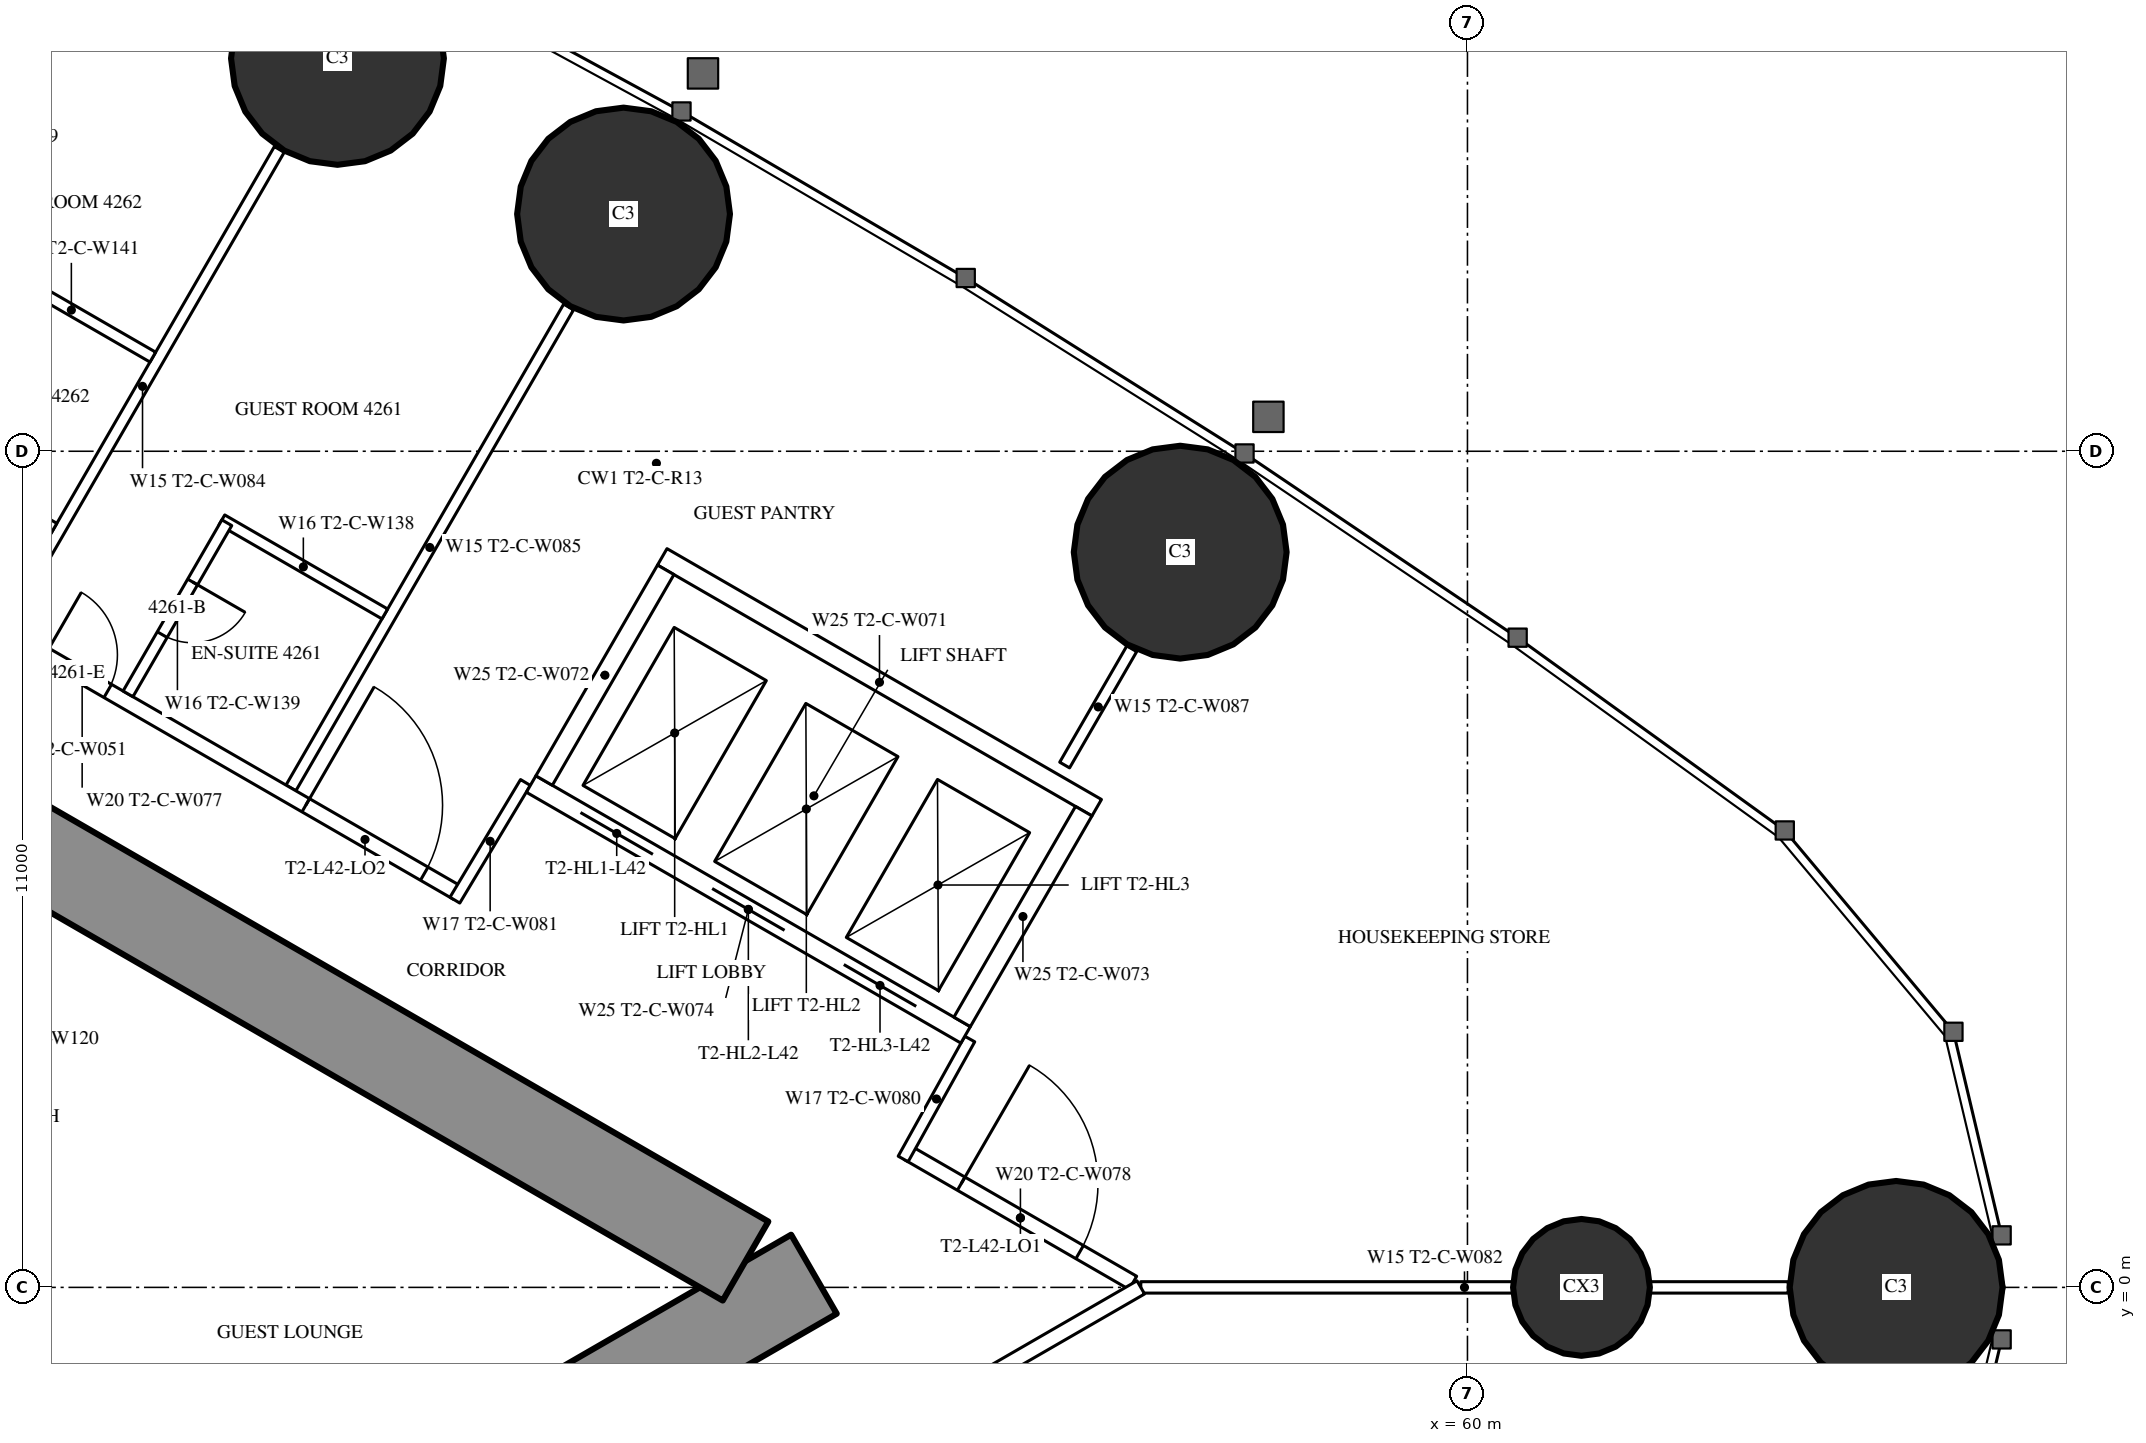
"""IFC4 building model, lengths in metres.
Left out: names, types, materials, properties, quantities, classifications, styles, units other than length and angle.
Written with IfcOpenShell. Run it as: python <this file> out.ifc"""

import sys

from ifc_helpers import new_model, si_unit, direction, frame, frame_2d, origin, origin_2d, place, context, subcontext, project, spatial, rectangle, circle, extrude, element, fill, save


model = new_model("IFC4")
c1 = context("Model", 3, precision=1e-05, world=origin(), true_north=direction((0.0, 1.0)))
c2 = subcontext(c1, "Body", "Model", "MODEL_VIEW")
j1 = project(units=[si_unit("LENGTHUNIT", "METRE"), si_unit("PLANEANGLEUNIT", "RADIAN")], contexts=[c1])
p1 = place(None, origin())
s1 = spatial("IfcSite", under=j1, at=p1, CompositionType="ELEMENT")
p2 = place(p1, origin())
s2 = spatial("IfcBuilding", under=s1, at=p2, CompositionType="ELEMENT")
p3 = place(p2, frame((0.0, 0.0, 159.8)))
s3 = spatial("IfcBuildingStorey", under=s2, at=p3, CompositionType="ELEMENT", Elevation=159.8)
for number, where, z_axis, x_axis in (
    (1, (65.64, 0.0, 0.0), (0.0, 0.0, 1.0), (1.0, 0.0, 0.0)),
    (2, (56.221, 9.672, 0.0), (0.0, 0.0, 1.0), (1.0, 0.0, 0.0)),
    (3, (48.897, 14.121, 0.0), (0.0, 0.0, 1.0), (1.0, 0.0, 0.0)),
    (4, (45.134, 16.168, 0.0), (0.0, 0.0, 1.0), (1.0, 0.0, 0.0)),
):
    element("IfcColumn", number, at=place(p3, frame(where, z_axis=z_axis, x_axis=x_axis)), inside=s3, PredefinedType="COLUMN", context=c2, shape_type="SweptSolid", body=[
        extrude(circle(Radius=1.4, at=origin_2d()), origin(), (0.0, 0.0, 1.0), 3.5),
    ])
p4 = place(p3, frame((61.5, 0.0, 0.0), z_axis=(0.0, 0.0, 1.0), x_axis=(1.0, 0.0, 0.0)))
e5 = element("IfcColumn", 5, at=p4, inside=s3, PredefinedType="COLUMN", context=c2, shape_type="SweptSolid", body=[
    extrude(circle(Radius=0.9, at=origin_2d()), origin(), (0.0, 0.0, 1.0), 3.5),
])
p5 = place(p3, frame((27.2, -13.8, 0.0), z_axis=(0.0, 0.0, 1.0), x_axis=(0.866027159892, 0.499996958321, 0.0)))
e6 = element("IfcWall", 6, at=p5, inside=s3, PredefinedType="SHEAR", context=c2, shape_type="SweptSolid", body=[
    extrude(rectangle(XDim=27.947, YDim=1.2, at=frame_2d((13.973, 0.0))), origin(), (0.0, 0.0, 1.0), 3.5),
])
p6 = place(p5, frame((4.6, 0.0, 0.0)))
e7 = element("IfcOpeningElement", 7, at=p6, cuts=e6, PredefinedType="OPENING", context=c2, shape_type="SweptSolid", body=[
    extrude(rectangle(XDim=1.0, YDim=2.2, at=frame_2d((0.5, 1.1))), frame((0.0, 0.61, 0.0), z_axis=(0.0, -1.0, 0.0), x_axis=(1.0, 0.0, 0.0)), (0.0, 0.0, 1.0), 1.22),
])
p7 = place(p5, frame((13.395, 0.0, 0.0)))
e8 = element("IfcOpeningElement", 8, at=p7, cuts=e6, PredefinedType="OPENING", context=c2, shape_type="SweptSolid", body=[
    extrude(rectangle(XDim=1.8, YDim=2.2, at=frame_2d((0.9, 1.1))), frame((0.0, 0.61, 0.0), z_axis=(0.0, -1.0, 0.0), x_axis=(1.0, 0.0, 0.0)), (0.0, 0.0, 1.0), 1.22),
])
p8 = place(p3, frame((27.2, 13.8, 0.0), z_axis=(0.0, 0.0, 1.0), x_axis=(0.866024515034, -0.500001539357, 0.0)))
e9 = element("IfcWall", 9, at=p8, inside=s3, PredefinedType="SHEAR", context=c2, shape_type="SweptSolid", body=[
    extrude(rectangle(XDim=26.907, YDim=1.2, at=frame_2d((13.454, 0.0))), origin(), (0.0, 0.0, 1.0), 3.5),
])
p9 = place(p8, frame((4.6, 0.0, 0.0)))
e10 = element("IfcOpeningElement", 10, at=p9, cuts=e9, PredefinedType="OPENING", context=c2, shape_type="SweptSolid", body=[
    extrude(rectangle(XDim=1.0, YDim=2.2, at=frame_2d((0.5, 1.1))), frame((0.0, 0.61, 0.0), z_axis=(0.0, -1.0, 0.0), x_axis=(1.0, 0.0, 0.0)), (0.0, 0.0, 1.0), 1.22),
])
p10 = place(p8, frame((13.395, 0.0, 0.0)))
e11 = element("IfcOpeningElement", 11, at=p10, cuts=e9, PredefinedType="OPENING", context=c2, shape_type="SweptSolid", body=[
    extrude(rectangle(XDim=1.8, YDim=2.2, at=frame_2d((0.9, 1.1))), frame((0.0, 0.61, 0.0), z_axis=(0.0, -1.0, 0.0), x_axis=(1.0, 0.0, 0.0)), (0.0, 0.0, 1.0), 1.22),
])
p11 = place(p3, frame((37.022, 10.9, 0.0), z_axis=(0.0, 0.0, 1.0), x_axis=(0.499998620953, 0.866026199976, 0.0)))
e12 = element("IfcWall", 12, at=p11, inside=s3, PredefinedType="PARTITIONING", context=c2, shape_type="SweptSolid", body=[
    extrude(rectangle(XDim=9.77, YDim=0.15, at=frame_2d((4.885, 0.0))), origin(), (0.0, 0.0, 1.0), 3.25),
])
p12 = place(p3, frame((40.769, 8.737, 0.0), z_axis=(0.0, 0.0, 1.0), x_axis=(0.500013115284, 0.866017831539, 0.0)))
e13 = element("IfcWall", 13, at=p12, inside=s3, PredefinedType="PARTITIONING", context=c2, shape_type="SweptSolid", body=[
    extrude(rectangle(XDim=7.198, YDim=0.15, at=frame_2d((3.599, 0.0))), origin(), (0.0, 0.0, 1.0), 2.3),
])
p13 = place(p3, frame((44.521, 6.571, 0.0), z_axis=(0.0, 0.0, 1.0), x_axis=(0.500020376429, 0.866013639128, 0.0)))
e14 = element("IfcWall", 14, at=p13, inside=s3, PredefinedType="PARTITIONING", context=c2, shape_type="SweptSolid", body=[
    extrude(rectangle(XDim=7.306, YDim=0.15, at=frame_2d((3.653, 0.0))), origin(), (0.0, 0.0, 1.0), 2.3),
])
p14 = place(p3, frame((55.702, 0.0, 0.0), z_axis=(0.0, 0.0, 1.0), x_axis=(1.0, 0.0, 0.0)))
e15 = element("IfcWall", 15, at=p14, inside=s3, PredefinedType="PARTITIONING", context=c2, shape_type="SweptSolid", body=[
    extrude(rectangle(XDim=8.518, YDim=0.15, at=frame_2d((4.259, 0.0))), origin(), (0.0, 0.0, 1.0), 2.3),
])
p15 = place(p3, frame((54.7, 6.872, 0.0), z_axis=(0.0, 0.0, 1.0), x_axis=(0.499989690894, 0.866031355668, 0.0)))
e16 = element("IfcWall", 16, at=p15, inside=s3, PredefinedType="PARTITIONING", context=c2, shape_type="SweptSolid", body=[
    extrude(rectangle(XDim=1.766, YDim=0.15, at=frame_2d((0.883, 0.0))), origin(), (0.0, 0.0, 1.0), 3.25),
])
p16 = place(p3, frame((36.834, 10.894, 0.0), z_axis=(0.0, 0.0, 1.0), x_axis=(0.866031655879, -0.499989170898, 0.0)))
e17 = element("IfcWall", 17, at=p16, inside=s3, PredefinedType="PARTITIONING", context=c2, shape_type="SweptSolid", body=[
    extrude(rectangle(XDim=11.41, YDim=0.2, at=frame_2d((5.705, 0.0))), origin(), (0.0, 0.0, 1.0), 3.25),
])
p17 = place(p16, frame((5.144, 0.0, 0.0)))
e18 = element("IfcOpeningElement", 18, at=p17, cuts=e17, PredefinedType="OPENING", context=c2, shape_type="SweptSolid", body=[
    extrude(rectangle(XDim=0.95, YDim=2.2, at=frame_2d((0.475, 1.1))), frame((0.0, 0.11, 0.0), z_axis=(0.0, -1.0, 0.0), x_axis=(1.0, 0.0, 0.0)), (0.0, 0.0, 1.0), 0.22),
])
p18 = place(p16, frame((3.161, 0.0, 0.0)))
e19 = element("IfcOpeningElement", 19, at=p18, cuts=e17, PredefinedType="OPENING", context=c2, shape_type="SweptSolid", body=[
    extrude(rectangle(XDim=0.95, YDim=2.2, at=frame_2d((0.475, 1.1))), frame((0.0, 0.11, 0.0), z_axis=(0.0, -1.0, 0.0), x_axis=(1.0, 0.0, 0.0)), (0.0, 0.0, 1.0), 0.22),
])
p19 = place(p16, frame((9.102, 0.0, 0.0)))
e20 = element("IfcOpeningElement", 20, at=p19, cuts=e17, PredefinedType="OPENING", context=c2, shape_type="SweptSolid", body=[
    extrude(rectangle(XDim=1.8, YDim=2.2, at=frame_2d((0.9, 1.1))), frame((0.0, 0.11, 0.0), z_axis=(0.0, -1.0, 0.0), x_axis=(1.0, 0.0, 0.0)), (0.0, 0.0, 1.0), 0.22),
])
p20 = place(p3, frame((52.639, 1.769, 0.0), z_axis=(0.0, 0.0, 1.0), x_axis=(0.866027340901, -0.4999966448, 0.0)))
e21 = element("IfcWall", 21, at=p20, inside=s3, PredefinedType="PARTITIONING", context=c2, shape_type="SweptSolid", body=[
    extrude(rectangle(XDim=3.417, YDim=0.2, at=frame_2d((1.708, 0.0))), origin(), (0.0, 0.0, 1.0), 3.25),
])
p21 = place(p20, frame((0.809, 0.0, 0.0)))
e22 = element("IfcOpeningElement", 22, at=p21, cuts=e21, PredefinedType="OPENING", context=c2, shape_type="SweptSolid", body=[
    extrude(rectangle(XDim=1.8, YDim=2.2, at=frame_2d((0.9, 1.1))), frame((0.0, 0.11, 0.0), z_axis=(0.0, -1.0, 0.0), x_axis=(1.0, 0.0, 0.0)), (0.0, 0.0, 1.0), 0.22),
])
p22 = place(p3, frame((52.576, 1.689, 0.0), z_axis=(0.0, 0.0, 1.0), x_axis=(0.485424724123, 0.874278466629, 0.0)))
e23 = element("IfcWall", 23, at=p22, inside=s3, PredefinedType="PARTITIONING", context=c2, shape_type="SweptSolid", body=[
    extrude(rectangle(XDim=1.805, YDim=0.15, at=frame_2d((0.903, 0.0))), origin(), (0.0, 0.0, 1.0), 3.25),
])
p23 = place(p3, frame((47.606, 6.643, 0.0), z_axis=(0.0, 0.0, 1.0), x_axis=(-0.514237157483, -0.857648031458, 0.0)))
e24 = element("IfcWall", 24, at=p23, inside=s3, PredefinedType="PARTITIONING", context=c2, shape_type="SweptSolid", body=[
    extrude(rectangle(XDim=1.805, YDim=0.15, at=frame_2d((0.902, 0.0))), origin(), (0.0, 0.0, 1.0), 3.25),
])
p24 = place(p3, frame((40.741, -8.638, 0.0), z_axis=(0.0, 0.0, 1.0), x_axis=(0.866022967338, 0.500004220025, 0.0)))
e25 = element("IfcWall", 25, at=p24, inside=s3, PredefinedType="PARTITIONING", context=c2, shape_type="SweptSolid", body=[
    extrude(rectangle(XDim=17.276, YDim=0.2, at=frame_2d((8.638, 0.0))), origin(), (0.0, 0.0, 1.0), 3.25),
])
p25 = place(p24, frame((7.316, 0.0, 0.0)))
e26 = element("IfcOpeningElement", 26, at=p25, cuts=e25, PredefinedType="OPENING", context=c2, shape_type="SweptSolid", body=[
    extrude(rectangle(XDim=0.95, YDim=2.2, at=frame_2d((0.475, 1.1))), frame((0.0, 0.11, 0.0), z_axis=(0.0, -1.0, 0.0), x_axis=(1.0, 0.0, 0.0)), (0.0, 0.0, 1.0), 0.22),
])
p26 = place(p24, frame((11.366, 0.0, 0.0)))
e27 = element("IfcOpeningElement", 27, at=p26, cuts=e25, PredefinedType="OPENING", context=c2, shape_type="SweptSolid", body=[
    extrude(rectangle(XDim=0.95, YDim=2.2, at=frame_2d((0.475, 1.1))), frame((0.0, 0.11, 0.0), z_axis=(0.0, -1.0, 0.0), x_axis=(1.0, 0.0, 0.0)), (0.0, 0.0, 1.0), 0.22),
])
p27 = place(p24, frame((13.347, 0.0, 0.0)))
e28 = element("IfcOpeningElement", 28, at=p27, cuts=e25, PredefinedType="OPENING", context=c2, shape_type="SweptSolid", body=[
    extrude(rectangle(XDim=0.95, YDim=2.2, at=frame_2d((0.475, 1.1))), frame((0.0, 0.11, 0.0), z_axis=(0.0, -1.0, 0.0), x_axis=(1.0, 0.0, 0.0)), (0.0, 0.0, 1.0), 0.22),
])
p28 = place(p3, frame((43.613, 10.097, 0.0), z_axis=(0.0, 0.0, 1.0), x_axis=(0.866031185235, -0.4999899861, 0.0)))
e29 = element("IfcWall", 29, at=p28, inside=s3, PredefinedType="PARTITIONING", context=c2, shape_type="SweptSolid", body=[
    extrude(rectangle(XDim=2.475, YDim=0.15, at=frame_2d((1.238, 0.0))), origin(), (0.0, 0.0, 1.0), 3.25),
])
p29 = place(p3, frame((42.378, 7.808, 0.0), z_axis=(0.0, 0.0, 1.0), x_axis=(0.500006934395, 0.866021400173, 0.0)))
e30 = element("IfcWall", 30, at=p29, inside=s3, PredefinedType="PARTITIONING", context=c2, shape_type="SweptSolid", body=[
    extrude(rectangle(XDim=2.6, YDim=0.15, at=frame_2d((1.3, 0.0))), origin(), (0.0, 0.0, 1.0), 3.25),
])
p30 = place(p29, frame((0.9, 0.0, 0.0)))
e31 = element("IfcOpeningElement", 31, at=p30, cuts=e30, PredefinedType="OPENING", context=c2, shape_type="SweptSolid", body=[
    extrude(rectangle(XDim=0.8, YDim=2.2, at=frame_2d((0.4, 1.1))), frame((0.0, 0.085, 0.0), z_axis=(0.0, -1.0, 0.0), x_axis=(1.0, 0.0, 0.0)), (0.0, 0.0, 1.0), 0.17),
])
p31 = place(p3, frame((40.561, 13.476, 0.0), z_axis=(0.0, 0.0, 1.0), x_axis=(0.866006523861, -0.500032699561, 0.0)))
e32 = element("IfcWall", 32, at=p31, inside=s3, PredefinedType="PARTITIONING", context=c2, shape_type="SweptSolid", body=[
    extrude(rectangle(XDim=2.475, YDim=0.15, at=frame_2d((1.237, 0.0))), origin(), (0.0, 0.0, 1.0), 3.25),
])
p32 = place(p3, frame((39.261, 11.224, 0.0), z_axis=(0.0, 0.0, 1.0), x_axis=(0.866006523861, -0.500032699561, 0.0)))
e33 = element("IfcWall", 33, at=p32, inside=s3, PredefinedType="PARTITIONING", context=c2, shape_type="SweptSolid", body=[
    extrude(rectangle(XDim=2.475, YDim=0.15, at=frame_2d((1.237, 0.0))), origin(), (0.0, 0.0, 1.0), 2.45),
])
p33 = place(p3, frame((47.681, 6.622, 0.0), z_axis=(0.0, 0.0, 1.0), x_axis=(0.86603344179, -0.499986077507, 0.0)))
e34 = element("IfcWall", 34, at=p33, inside=s3, PredefinedType="PARTITIONING", context=c2, shape_type="SweptSolid", body=[
    extrude(rectangle(XDim=6.6, YDim=0.25, at=frame_2d((3.3, 0.0))), origin(), (0.0, 0.0, 1.0), 3.25),
])
p34 = place(p33, frame((0.75, 0.0, 0.0)))
e35 = element("IfcOpeningElement", 35, at=p34, cuts=e34, PredefinedType="OPENING", context=c2, shape_type="SweptSolid", body=[
    extrude(rectangle(XDim=1.1, YDim=2.2, at=frame_2d((0.55, 1.1))), frame((0.0, 0.135, 0.0), z_axis=(0.0, -1.0, 0.0), x_axis=(1.0, 0.0, 0.0)), (0.0, 0.0, 1.0), 0.27),
])
p35 = place(p33, frame((2.75, 0.0, 0.0)))
e36 = element("IfcOpeningElement", 36, at=p35, cuts=e34, PredefinedType="OPENING", context=c2, shape_type="SweptSolid", body=[
    extrude(rectangle(XDim=1.1, YDim=2.2, at=frame_2d((0.55, 1.1))), frame((0.0, 0.135, 0.0), z_axis=(0.0, -1.0, 0.0), x_axis=(1.0, 0.0, 0.0)), (0.0, 0.0, 1.0), 0.27),
])
p36 = place(p33, frame((4.75, 0.0, 0.0)))
e37 = element("IfcOpeningElement", 37, at=p36, cuts=e34, PredefinedType="OPENING", context=c2, shape_type="SweptSolid", body=[
    extrude(rectangle(XDim=1.1, YDim=2.2, at=frame_2d((0.55, 1.1))), frame((0.0, 0.135, 0.0), z_axis=(0.0, -1.0, 0.0), x_axis=(1.0, 0.0, 0.0)), (0.0, 0.0, 1.0), 0.27),
])
p37 = place(p3, frame((49.406, 9.611, 0.0), z_axis=(0.0, 0.0, 1.0), x_axis=(0.86603344179, -0.499986077507, 0.0)))
e38 = element("IfcWall", 38, at=p37, inside=s3, PredefinedType="PARTITIONING", context=c2, shape_type="SweptSolid", body=[
    extrude(rectangle(XDim=6.6, YDim=0.25, at=frame_2d((3.3, 0.0))), origin(), (0.0, 0.0, 1.0), 3.25),
])
p38 = place(p3, frame((47.852, 6.668, 0.0), z_axis=(0.0, 0.0, 1.0), x_axis=(0.499929347863, 0.866066190972, 0.0)))
e39 = element("IfcWall", 39, at=p38, inside=s3, PredefinedType="PARTITIONING", context=c2, shape_type="SweptSolid", body=[
    extrude(rectangle(XDim=3.201, YDim=0.25, at=frame_2d((1.6, 0.0))), origin(), (0.0, 0.0, 1.0), 3.25),
])
p39 = place(p3, frame((53.352, 3.493, 0.0), z_axis=(0.0, 0.0, 1.0), x_axis=(0.499872130319, 0.866099216793, 0.0)))
e40 = element("IfcWall", 40, at=p39, inside=s3, PredefinedType="PARTITIONING", context=c2, shape_type="SweptSolid", body=[
    extrude(rectangle(XDim=3.2, YDim=0.25, at=frame_2d((1.6, 0.0))), origin(), (0.0, 0.0, 1.0), 3.25),
])
p40 = place(p30, origin())
e41 = element("IfcDoor", 41, at=p40, inside=s3, OperationType="SINGLE_SWING_RIGHT", PredefinedType="DOOR", context=c2, shape_type="SweptSolid", body=[
    extrude(rectangle(XDim=0.8, YDim=2.2, at=frame_2d((0.4, 1.1))), frame((0.0, 0.025, 0.0), z_axis=(0.0, -1.0, 0.0), x_axis=(1.0, 0.0, 0.0)), (0.0, 0.0, 1.0), 0.05),
])
fill(e31, e41)
p41 = place(p17, origin())
e42 = element("IfcDoor", 42, at=p41, inside=s3, OperationType="SINGLE_SWING_LEFT", PredefinedType="DOOR", context=c2, shape_type="SweptSolid", body=[
    extrude(rectangle(XDim=0.95, YDim=2.2, at=frame_2d((0.475, 1.1))), frame((0.0, 0.025, 0.0), z_axis=(0.0, -1.0, 0.0), x_axis=(1.0, 0.0, 0.0)), (0.0, 0.0, 1.0), 0.05),
])
fill(e18, e42)
p42 = place(p21, origin())
e43 = element("IfcDoor", 43, at=p42, inside=s3, OperationType="DOUBLE_DOOR_SINGLE_SWING", PredefinedType="DOOR", context=c2, shape_type="SweptSolid", body=[
    extrude(rectangle(XDim=1.8, YDim=2.2, at=frame_2d((0.9, 1.1))), frame((0.0, 0.025, 0.0), z_axis=(0.0, -1.0, 0.0), x_axis=(1.0, 0.0, 0.0)), (0.0, 0.0, 1.0), 0.05),
])
fill(e22, e43)
p43 = place(p19, origin())
e44 = element("IfcDoor", 44, at=p43, inside=s3, OperationType="DOUBLE_DOOR_SINGLE_SWING", PredefinedType="DOOR", context=c2, shape_type="SweptSolid", body=[
    extrude(rectangle(XDim=1.8, YDim=2.2, at=frame_2d((0.9, 1.1))), frame((0.0, 0.025, 0.0), z_axis=(0.0, -1.0, 0.0), x_axis=(1.0, 0.0, 0.0)), (0.0, 0.0, 1.0), 0.05),
])
fill(e20, e44)
p44 = place(p34, origin())
e45 = element("IfcDoor", 45, at=p44, inside=s3, OperationType="DOUBLE_DOOR_SLIDING", PredefinedType="USERDEFINED", context=c2, shape_type="SweptSolid", body=[
    extrude(rectangle(XDim=1.1, YDim=2.2, at=frame_2d((0.55, 1.1))), frame((0.0, 0.025, 0.0), z_axis=(0.0, -1.0, 0.0), x_axis=(1.0, 0.0, 0.0)), (0.0, 0.0, 1.0), 0.05),
])
fill(e35, e45)
p45 = place(p35, origin())
e46 = element("IfcDoor", 46, at=p45, inside=s3, OperationType="DOUBLE_DOOR_SLIDING", PredefinedType="USERDEFINED", context=c2, shape_type="SweptSolid", body=[
    extrude(rectangle(XDim=1.1, YDim=2.2, at=frame_2d((0.55, 1.1))), frame((0.0, 0.025, 0.0), z_axis=(0.0, -1.0, 0.0), x_axis=(1.0, 0.0, 0.0)), (0.0, 0.0, 1.0), 0.05),
])
fill(e36, e46)
p46 = place(p36, origin())
e47 = element("IfcDoor", 47, at=p46, inside=s3, OperationType="DOUBLE_DOOR_SLIDING", PredefinedType="USERDEFINED", context=c2, shape_type="SweptSolid", body=[
    extrude(rectangle(XDim=1.1, YDim=2.2, at=frame_2d((0.55, 1.1))), frame((0.0, 0.025, 0.0), z_axis=(0.0, -1.0, 0.0), x_axis=(1.0, 0.0, 0.0)), (0.0, 0.0, 1.0), 0.05),
])
fill(e37, e47)
save(model, sys.argv[1])
